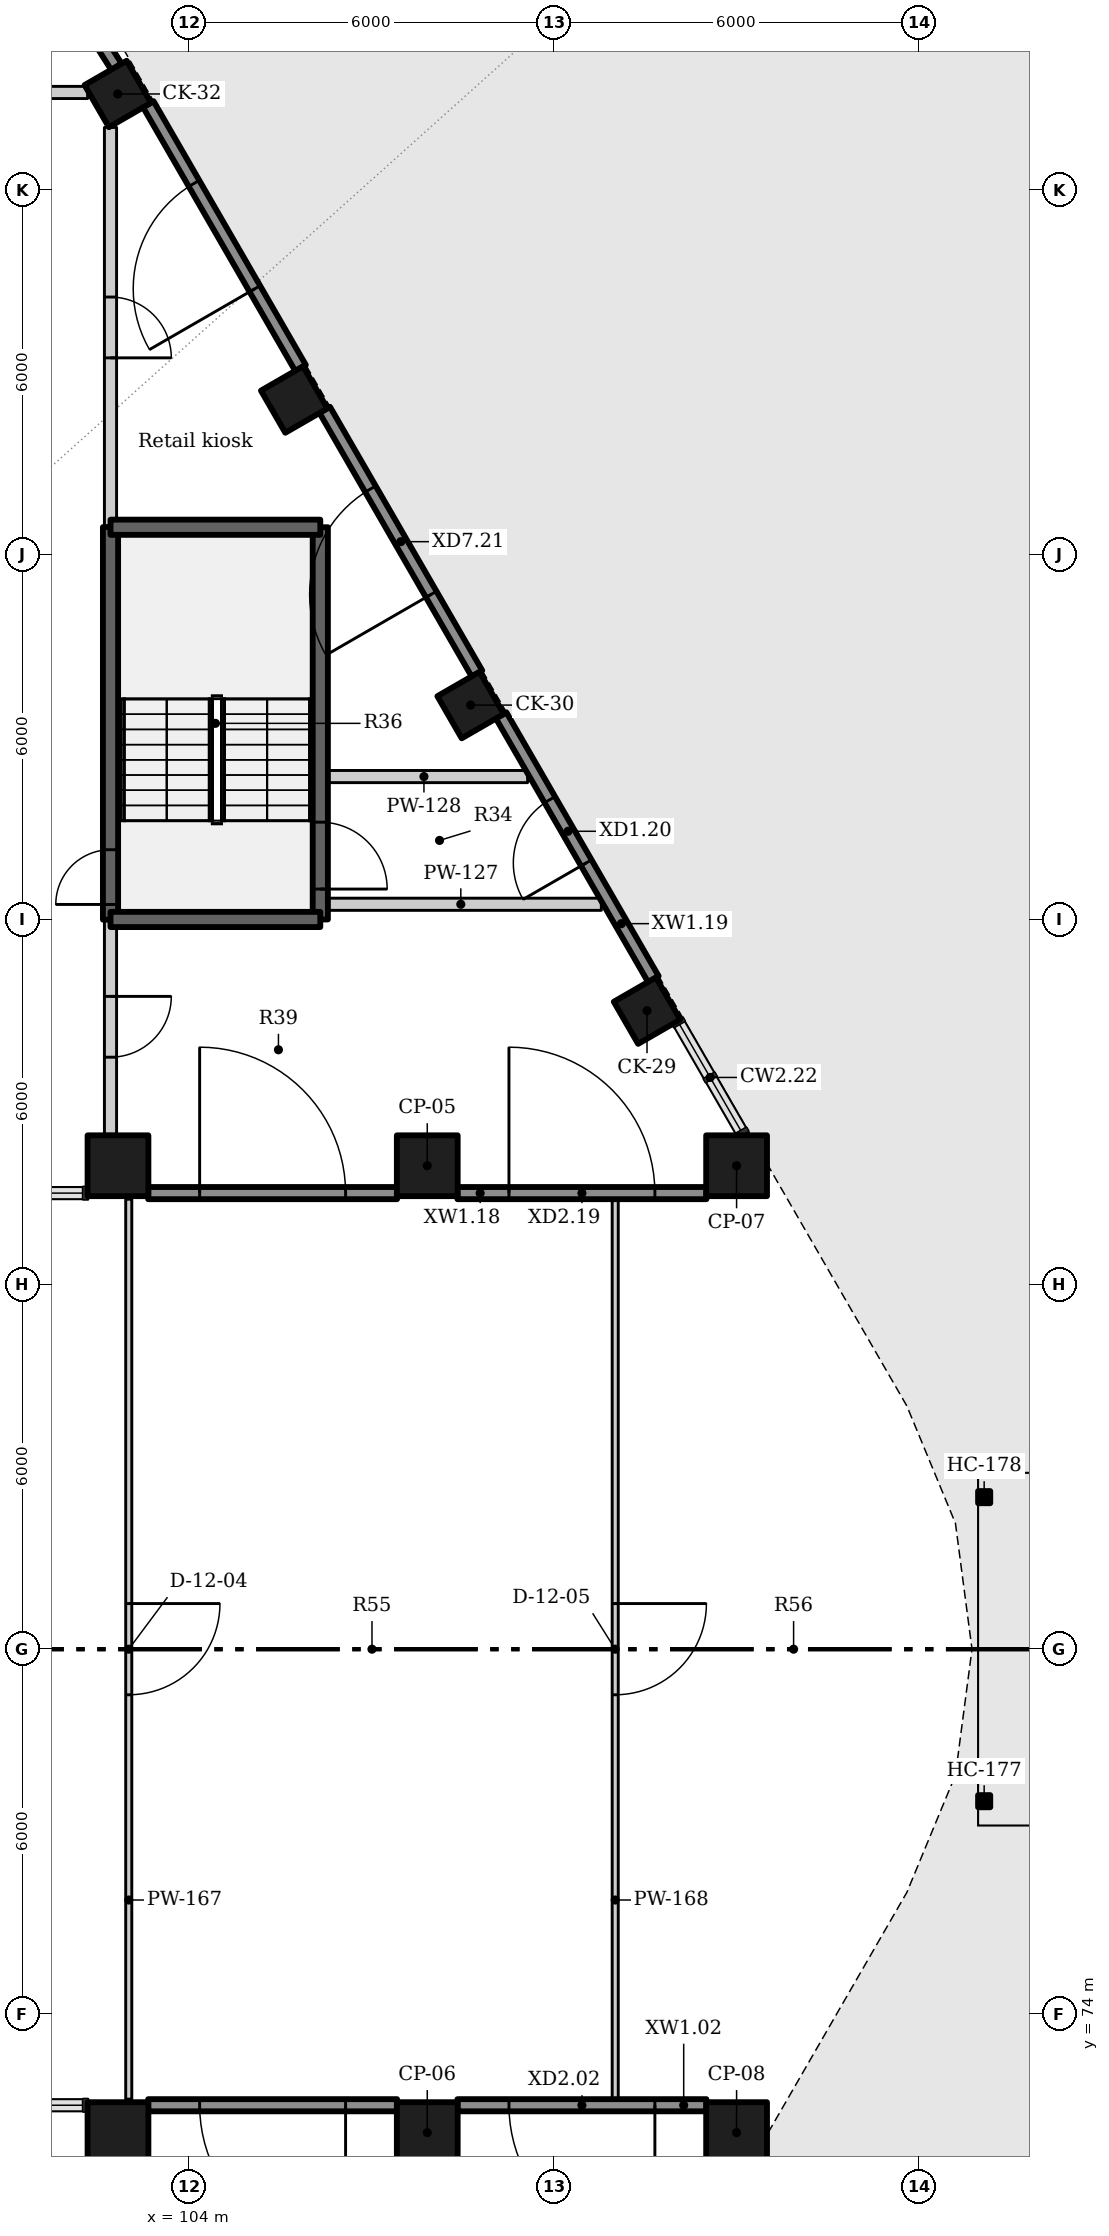
"""IFC4 building model, lengths in metres.
Left out: names, types, materials, properties, quantities, classifications, styles, units other than length and angle.
Written with IfcOpenShell. Run it as: python <this file> out.ifc"""

import sys

from ifc_helpers import new_model, si_unit, direction, frame, frame_2d, origin, origin_2d, place, context, subcontext, project, spatial, rectangle, hollow_rectangle, extrude, element, fill, save


model = new_model("IFC4")
c1 = context("Model", 3, precision=1e-05, world=origin(), true_north=direction((0.0, 1.0)))
c2 = subcontext(c1, "Body", "Model", "MODEL_VIEW")
j1 = project(units=[si_unit("LENGTHUNIT", "METRE"), si_unit("PLANEANGLEUNIT", "RADIAN")], contexts=[c1])
p1 = place(None, origin())
s1 = spatial("IfcSite", under=j1, at=p1, CompositionType="ELEMENT")
p2 = place(p1, origin())
s2 = spatial("IfcBuilding", under=s1, at=p2, CompositionType="ELEMENT")
p3 = place(p2, origin())
s3 = spatial("IfcBuildingStorey", under=s2, at=p3, CompositionType="ELEMENT", Elevation=0.0)
for number, where, z_axis, x_axis in (
    (1, (111.523, 90.5, -1.8), (0.0, 0.0, 1.0), (-0.5, 0.866, 0.0)),
    (2, (108.622, 95.525, -1.8), (0.0, 0.0, 1.0), (-0.5, 0.866, 0.0)),
    (3, (105.721, 100.55, -1.8), (0.0, 0.0, 1.0), (-0.5, 0.866, 0.0)),
    (4, (102.82, 105.575, -1.8), (0.0, 0.0, 1.0), (-0.5, 0.866, 0.0)),
):
    element("IfcColumn", number, at=place(p3, frame(where, z_axis=z_axis, x_axis=x_axis)), inside=s3, PredefinedType="COLUMN", context=c2, shape_type="SweptSolid", body=[
        extrude(rectangle(XDim=0.8, YDim=0.8, at=origin_2d()), origin(), (0.0, 0.0, 1.0), 8.4),
    ])
for number, where, z_axis, x_axis in (
    (5, (102.823, 87.95, -1.8), (0.0, 0.0, 1.0), (1.0, 0.0, 0.0)),
    (6, (102.823, 72.05, -1.8), (0.0, 0.0, 1.0), (1.0, 0.0, 0.0)),
    (7, (107.909, 87.95, -1.8), (0.0, 0.0, 1.0), (1.0, 0.0, 0.0)),
    (8, (107.909, 72.05, -1.8), (0.0, 0.0, 1.0), (1.0, 0.0, 0.0)),
    (9, (112.996, 87.95, -1.8), (0.0, 0.0, 1.0), (1.0, 0.0, 0.0)),
    (10, (112.996, 72.05, -1.8), (0.0, 0.0, 1.0), (1.0, 0.0, 0.0)),
):
    element("IfcColumn", number, at=place(p3, frame(where, z_axis=z_axis, x_axis=x_axis)), inside=s3, PredefinedType="COLUMN", context=c2, shape_type="SweptSolid", body=[
        extrude(rectangle(XDim=1.0, YDim=1.0, at=origin_2d()), origin(), (0.0, 0.0, 1.0), 8.4),
    ])
p4 = place(p3, frame((112.5, 72.5, 0.0), z_axis=(0.0, 0.0, 1.0), x_axis=(-1.0, 0.0, 0.0)))
e11 = element("IfcWall", 11, at=p4, inside=s3, PredefinedType="SOLIDWALL", context=c2, shape_type="SweptSolid", body=[
    extrude(rectangle(XDim=4.095, YDim=0.2, at=frame_2d((2.047, 0.0))), origin(), (0.0, 0.0, 1.0), 5.4),
])
p5 = place(p4, frame((0.847, 0.0, 0.0)))
e12 = element("IfcOpeningElement", 12, at=p5, cuts=e11, PredefinedType="OPENING", context=c2, shape_type="SweptSolid", body=[
    extrude(rectangle(XDim=2.4, YDim=2.7, at=frame_2d((1.2, 1.35))), frame((0.0, 0.11, 0.0), z_axis=(0.0, -1.0, 0.0), x_axis=(1.0, 0.0, 0.0)), (0.0, 0.0, 1.0), 0.22),
])
p6 = place(p3, frame((107.413, 72.5, 0.0), z_axis=(0.0, 0.0, 1.0), x_axis=(-1.0, 0.0, 0.0)))
e13 = element("IfcWall", 13, at=p6, inside=s3, PredefinedType="SOLIDWALL", context=c2, shape_type="SweptSolid", body=[
    extrude(rectangle(XDim=4.094, YDim=0.2, at=frame_2d((2.047, 0.0))), origin(), (0.0, 0.0, 1.0), 5.4),
])
p7 = place(p6, frame((0.847, 0.0, 0.0)))
e14 = element("IfcOpeningElement", 14, at=p7, cuts=e13, PredefinedType="OPENING", context=c2, shape_type="SweptSolid", body=[
    extrude(rectangle(XDim=2.4, YDim=2.7, at=frame_2d((1.2, 1.35))), frame((0.0, 0.11, 0.0), z_axis=(0.0, -1.0, 0.0), x_axis=(1.0, 0.0, 0.0)), (0.0, 0.0, 1.0), 0.22),
])
p8 = place(p3, frame((103.319, 87.5, 0.0), z_axis=(0.0, 0.0, 1.0), x_axis=(1.0, 0.0, 0.0)))
e15 = element("IfcWall", 15, at=p8, inside=s3, PredefinedType="SOLIDWALL", context=c2, shape_type="SweptSolid", body=[
    extrude(rectangle(XDim=4.094, YDim=0.2, at=frame_2d((2.047, 0.0))), origin(), (0.0, 0.0, 1.0), 5.4),
])
p9 = place(p8, frame((0.847, 0.0, 0.0)))
e16 = element("IfcOpeningElement", 16, at=p9, cuts=e15, PredefinedType="OPENING", context=c2, shape_type="SweptSolid", body=[
    extrude(rectangle(XDim=2.4, YDim=2.7, at=frame_2d((1.2, 1.35))), frame((0.0, 0.11, 0.0), z_axis=(0.0, -1.0, 0.0), x_axis=(1.0, 0.0, 0.0)), (0.0, 0.0, 1.0), 0.22),
])
p10 = place(p3, frame((108.405, 87.5, 0.0), z_axis=(0.0, 0.0, 1.0), x_axis=(1.0, 0.0, 0.0)))
e17 = element("IfcWall", 17, at=p10, inside=s3, PredefinedType="SOLIDWALL", context=c2, shape_type="SweptSolid", body=[
    extrude(rectangle(XDim=4.095, YDim=0.2, at=frame_2d((2.047, 0.0))), origin(), (0.0, 0.0, 1.0), 5.4),
])
p11 = place(p10, frame((0.847, 0.0, 0.0)))
e18 = element("IfcOpeningElement", 18, at=p11, cuts=e17, PredefinedType="OPENING", context=c2, shape_type="SweptSolid", body=[
    extrude(rectangle(XDim=2.4, YDim=2.7, at=frame_2d((1.2, 1.35))), frame((0.0, 0.11, 0.0), z_axis=(0.0, -1.0, 0.0), x_axis=(1.0, 0.0, 0.0)), (0.0, 0.0, 1.0), 0.22),
])
p12 = place(p3, frame((111.628, 91.018, 0.0), z_axis=(0.0, 0.0, 1.0), x_axis=(-0.499990997566, 0.86603060128, 0.0)))
e19 = element("IfcWall", 19, at=p12, inside=s3, PredefinedType="SOLIDWALL", context=c2, shape_type="SweptSolid", body=[
    extrude(rectangle(XDim=5.01, YDim=0.2, at=frame_2d((2.505, 0.0))), origin(), (0.0, 0.0, 1.0), 5.4),
])
p13 = place(p12, frame((2.208, 0.0, 0.0)))
e20 = element("IfcOpeningElement", 20, at=p13, cuts=e19, PredefinedType="OPENING", context=c2, shape_type="SweptSolid", body=[
    extrude(rectangle(XDim=1.2, YDim=2.4, at=frame_2d((0.6, 1.2))), frame((0.0, 0.11, 0.0), z_axis=(0.0, -1.0, 0.0), x_axis=(1.0, 0.0, 0.0)), (0.0, 0.0, 1.0), 0.22),
])
p14 = place(p3, frame((108.727, 96.043, 0.0), z_axis=(0.0, 0.0, 1.0), x_axis=(-0.499990997566, 0.86603060128, 0.0)))
e21 = element("IfcWall", 21, at=p14, inside=s3, PredefinedType="SOLIDWALL", context=c2, shape_type="SweptSolid", body=[
    extrude(rectangle(XDim=5.01, YDim=0.2, at=frame_2d((2.505, 0.0))), origin(), (0.0, 0.0, 1.0), 5.4),
])
p15 = place(p14, frame((1.505, 0.0, 0.0)))
e22 = element("IfcOpeningElement", 22, at=p15, cuts=e21, PredefinedType="OPENING", context=c2, shape_type="SweptSolid", body=[
    extrude(rectangle(XDim=2.0, YDim=2.4, at=frame_2d((1.0, 1.2))), frame((0.0, 0.11, 0.0), z_axis=(0.0, -1.0, 0.0), x_axis=(1.0, 0.0, 0.0)), (0.0, 0.0, 1.0), 0.22),
])
p16 = place(p3, frame((105.826, 101.068, 0.0), z_axis=(0.0, 0.0, 1.0), x_axis=(-0.499990997566, 0.86603060128, 0.0)))
e23 = element("IfcWall", 23, at=p16, inside=s3, PredefinedType="SOLIDWALL", context=c2, shape_type="SweptSolid", body=[
    extrude(rectangle(XDim=5.01, YDim=0.2, at=frame_2d((2.505, 0.0))), origin(), (0.0, 0.0, 1.0), 5.4),
])
p17 = place(p16, frame((1.505, 0.0, 0.0)))
e24 = element("IfcOpeningElement", 24, at=p17, cuts=e23, PredefinedType="OPENING", context=c2, shape_type="SweptSolid", body=[
    extrude(rectangle(XDim=2.0, YDim=2.4, at=frame_2d((1.0, 1.2))), frame((0.0, 0.11, 0.0), z_axis=(0.0, -1.0, 0.0), x_axis=(1.0, 0.0, 0.0)), (0.0, 0.0, 1.0), 0.22),
])
p18 = place(p3, frame((102.798, 106.022, 0.0), z_axis=(0.0, 0.0, 1.0), x_axis=(-0.537671911107, 0.843154147239, 0.0)))
e25 = element("IfcWall", 25, at=p18, inside=s3, PredefinedType="SOLIDWALL", context=c2, shape_type="SweptSolid", body=[
    extrude(rectangle(XDim=5.057, YDim=0.2, at=frame_2d((2.528, 0.0))), origin(), (0.0, 0.0, 1.0), 5.4),
])
p19 = place(p18, frame((1.928, 0.0, 0.0)))
e26 = element("IfcOpeningElement", 26, at=p19, cuts=e25, PredefinedType="OPENING", context=c2, shape_type="SweptSolid", body=[
    extrude(rectangle(XDim=1.2, YDim=2.4, at=frame_2d((0.6, 1.2))), frame((0.0, 0.11, 0.0), z_axis=(0.0, -1.0, 0.0), x_axis=(1.0, 0.0, 0.0)), (0.0, 0.0, 1.0), 0.22),
])
p20 = place(p3, frame((102.7, 91.997, -1.8), z_axis=(0.0, 0.0, 1.0), x_axis=(0.0, 1.0, 0.0)))
e27 = element("IfcWall", 27, at=p20, inside=s3, PredefinedType="SHEAR", context=c2, shape_type="SweptSolid", body=[
    extrude(rectangle(XDim=6.456, YDim=0.25, at=frame_2d((3.228, 0.0))), origin(), (0.0, 0.0, 1.0), 8.1),
])
p21 = place(p20, frame((0.25, 0.0, 1.8)))
e28 = element("IfcOpeningElement", 28, at=p21, cuts=e27, PredefinedType="OPENING", context=c2, shape_type="SweptSolid", body=[
    extrude(rectangle(XDim=0.9, YDim=2.1, at=frame_2d((0.45, 1.05))), frame((0.0, 0.135, 0.0), z_axis=(0.0, -1.0, 0.0), x_axis=(1.0, 0.0, 0.0)), (0.0, 0.0, 1.0), 0.27),
])
p22 = place(p3, frame((102.7, 92.003, 0.0), z_axis=(0.0, 0.0, 1.0), x_axis=(0.0, -1.0, 0.0)))
e29 = element("IfcWall", 29, at=p22, inside=s3, PredefinedType="PARTITIONING", context=c2, shape_type="SweptSolid", body=[
    extrude(rectangle(XDim=3.536, YDim=0.2, at=frame_2d((1.768, 0.0))), origin(), (0.0, 0.0, 1.0), 6.3),
])
p23 = place(p22, frame((1.268, 0.0, 0.0)))
e30 = element("IfcOpeningElement", 30, at=p23, cuts=e29, PredefinedType="OPENING", context=c2, shape_type="SweptSolid", body=[
    extrude(rectangle(XDim=1.0, YDim=2.1, at=frame_2d((0.5, 1.05))), frame((0.0, 0.11, 0.0), z_axis=(0.0, -1.0, 0.0), x_axis=(1.0, 0.0, 0.0)), (0.0, 0.0, 1.0), 0.22),
])
p24 = place(p3, frame((102.7, 105.025, 0.0), z_axis=(0.0, 0.0, 1.0), x_axis=(0.0, -1.0, 0.0)))
e31 = element("IfcWall", 31, at=p24, inside=s3, PredefinedType="PARTITIONING", context=c2, shape_type="SweptSolid", body=[
    extrude(rectangle(XDim=6.578, YDim=0.2, at=frame_2d((3.289, 0.0))), origin(), (0.0, 0.0, 1.0), 6.3),
])
p25 = place(p24, frame((2.789, 0.0, 0.0)))
e32 = element("IfcOpeningElement", 32, at=p25, cuts=e31, PredefinedType="OPENING", context=c2, shape_type="SweptSolid", body=[
    extrude(rectangle(XDim=1.0, YDim=2.1, at=frame_2d((0.5, 1.05))), frame((0.0, 0.11, 0.0), z_axis=(0.0, -1.0, 0.0), x_axis=(1.0, 0.0, 0.0)), (0.0, 0.0, 1.0), 0.22),
])
p26 = place(p3, frame((81.6, 105.6, 0.0), z_axis=(0.0, 0.0, 1.0), x_axis=(1.0, 0.0, 0.0)))
e33 = element("IfcWall", 33, at=p26, inside=s3, PredefinedType="PARTITIONING", context=c2, shape_type="SweptSolid", body=[
    extrude(rectangle(XDim=20.723, YDim=0.2, at=frame_2d((10.362, 0.0))), origin(), (0.0, 0.0, 1.0), 6.3),
])
p27 = place(p26, frame((11.951, 0.0, 0.0)))
e34 = element("IfcOpeningElement", 34, at=p27, cuts=e33, PredefinedType="OPENING", context=c2, shape_type="SweptSolid", body=[
    extrude(rectangle(XDim=1.0, YDim=2.1, at=frame_2d((0.5, 1.05))), frame((0.0, 0.11, 0.0), z_axis=(0.0, -1.0, 0.0), x_axis=(1.0, 0.0, 0.0)), (0.0, 0.0, 1.0), 0.22),
])
p28 = place(p3, frame((106.15, 98.45, -1.8), z_axis=(0.0, 0.0, 1.0), x_axis=(0.0, -1.0, 0.0)))
e35 = element("IfcWall", 35, at=p28, inside=s3, PredefinedType="SHEAR", context=c2, shape_type="SweptSolid", body=[
    extrude(rectangle(XDim=6.45, YDim=0.25, at=frame_2d((3.225, 0.0))), origin(), (0.0, 0.0, 1.0), 8.1),
])
p29 = place(p28, frame((4.85, 0.0, 1.8)))
e36 = element("IfcOpeningElement", 36, at=p29, cuts=e35, PredefinedType="OPENING", context=c2, shape_type="SweptSolid", body=[
    extrude(rectangle(XDim=1.1, YDim=2.1, at=frame_2d((0.55, 1.05))), frame((0.0, 0.135, 0.0), z_axis=(0.0, -1.0, 0.0), x_axis=(1.0, 0.0, 0.0)), (0.0, 0.0, 1.0), 0.27),
])
p30 = place(p3, frame((106.15, 92.25, 0.0), z_axis=(0.0, 0.0, 1.0), x_axis=(1.0, 0.0, 0.0)))
e37 = element("IfcWall", 37, at=p30, inside=s3, PredefinedType="PARTITIONING", context=c2, shape_type="SweptSolid", body=[
    extrude(rectangle(XDim=4.622, YDim=0.2, at=frame_2d((2.311, 0.0))), origin(), (0.0, 0.0, 1.0), 5.53),
])
p31 = place(p3, frame((106.15, 94.35, 0.0), z_axis=(0.0, 0.0, 1.0), x_axis=(1.0, 0.0, 0.0)))
e38 = element("IfcWall", 38, at=p31, inside=s3, PredefinedType="PARTITIONING", context=c2, shape_type="SweptSolid", body=[
    extrude(rectangle(XDim=3.409, YDim=0.2, at=frame_2d((1.705, 0.0))), origin(), (0.0, 0.0, 1.0), 5.53),
])
for number, where, z_axis, x_axis in (
    (39, (102.7, 92.0, -1.8), (0.0, 0.0, 1.0), (1.0, 0.0, 0.0)),
    (40, (102.7, 98.45, -1.8), (0.0, 0.0, 1.0), (1.0, 0.0, 0.0)),
):
    element("IfcWall", number, at=place(p3, frame(where, z_axis=z_axis, x_axis=x_axis)), inside=s3, PredefinedType="SHEAR", context=c2, shape_type="SweptSolid", body=[
        extrude(rectangle(XDim=3.45, YDim=0.25, at=frame_2d((1.725, 0.0))), origin(), (0.0, 0.0, 1.0), 8.1),
    ])
p32 = place(p3, frame((103.0, 87.4, 0.0), z_axis=(0.0, 0.0, 1.0), x_axis=(0.0, -1.0, 0.0)))
e41 = element("IfcWall", 41, at=p32, inside=s3, PredefinedType="PARTITIONING", context=c2, shape_type="SweptSolid", body=[
    extrude(rectangle(XDim=14.8, YDim=0.1, at=frame_2d((7.4, 0.0))), origin(), (0.0, 0.0, 1.0), 6.3),
])
p33 = place(p32, frame((6.65, 0.0, 0.0)))
e42 = element("IfcOpeningElement", 42, at=p33, cuts=e41, PredefinedType="OPENING", context=c2, shape_type="SweptSolid", body=[
    extrude(rectangle(XDim=1.5, YDim=2.1, at=frame_2d((0.75, 1.05))), frame((0.0, 0.06, 0.0), z_axis=(0.0, -1.0, 0.0), x_axis=(1.0, 0.0, 0.0)), (0.0, 0.0, 1.0), 0.12),
])
p34 = place(p3, frame((111.0, 87.4, 0.0), z_axis=(0.0, 0.0, 1.0), x_axis=(0.0, -1.0, 0.0)))
e43 = element("IfcWall", 43, at=p34, inside=s3, PredefinedType="PARTITIONING", context=c2, shape_type="SweptSolid", body=[
    extrude(rectangle(XDim=14.8, YDim=0.1, at=frame_2d((7.4, 0.0))), origin(), (0.0, 0.0, 1.0), 6.3),
])
p35 = place(p34, frame((6.65, 0.0, 0.0)))
e44 = element("IfcOpeningElement", 44, at=p35, cuts=e43, PredefinedType="OPENING", context=c2, shape_type="SweptSolid", body=[
    extrude(rectangle(XDim=1.5, YDim=2.1, at=frame_2d((0.75, 1.05))), frame((0.0, 0.06, 0.0), z_axis=(0.0, -1.0, 0.0), x_axis=(1.0, 0.0, 0.0)), (0.0, 0.0, 1.0), 0.12),
])
for number, where, z_axis, x_axis in (
    (45, (117.067, 77.5, 0.0), (0.0, 0.0, 1.0), (1.0, 0.0, 0.0)),
    (46, (117.067, 82.5, 0.0), (0.0, 0.0, 1.0), (1.0, 0.0, 0.0)),
):
    element("IfcColumn", number, at=place(p3, frame(where, z_axis=z_axis, x_axis=x_axis)), inside=s3, PredefinedType="COLUMN", context=c2, shape_type="SweptSolid", body=[
        extrude(hollow_rectangle(XDim=0.2, YDim=0.2, WallThickness=0.009, at=origin_2d()), origin(), (0.0, 0.0, 1.0), 2.9),
    ])
p36 = place(p5, origin())
e47 = element("IfcDoor", 47, at=p36, inside=s3, OperationType="DOUBLE_DOOR_DOUBLE_SWING", PredefinedType="DOOR", context=c2, shape_type="SweptSolid", body=[
    extrude(rectangle(XDim=2.4, YDim=2.7, at=frame_2d((1.2, 1.35))), frame((0.0, 0.025, 0.0), z_axis=(0.0, -1.0, 0.0), x_axis=(1.0, 0.0, 0.0)), (0.0, 0.0, 1.0), 0.05),
])
fill(e12, e47)
p37 = place(p7, origin())
e48 = element("IfcDoor", 48, at=p37, inside=s3, OperationType="DOUBLE_DOOR_DOUBLE_SWING", PredefinedType="DOOR", context=c2, shape_type="SweptSolid", body=[
    extrude(rectangle(XDim=2.4, YDim=2.7, at=frame_2d((1.2, 1.35))), frame((0.0, 0.025, 0.0), z_axis=(0.0, -1.0, 0.0), x_axis=(1.0, 0.0, 0.0)), (0.0, 0.0, 1.0), 0.05),
])
fill(e14, e48)
p38 = place(p9, origin())
e49 = element("IfcDoor", 49, at=p38, inside=s3, OperationType="DOUBLE_DOOR_DOUBLE_SWING", PredefinedType="DOOR", context=c2, shape_type="SweptSolid", body=[
    extrude(rectangle(XDim=2.4, YDim=2.7, at=frame_2d((1.2, 1.35))), frame((0.0, 0.025, 0.0), z_axis=(0.0, -1.0, 0.0), x_axis=(1.0, 0.0, 0.0)), (0.0, 0.0, 1.0), 0.05),
])
fill(e16, e49)
p39 = place(p11, origin())
e50 = element("IfcDoor", 50, at=p39, inside=s3, OperationType="DOUBLE_DOOR_DOUBLE_SWING", PredefinedType="DOOR", context=c2, shape_type="SweptSolid", body=[
    extrude(rectangle(XDim=2.4, YDim=2.7, at=frame_2d((1.2, 1.35))), frame((0.0, 0.025, 0.0), z_axis=(0.0, -1.0, 0.0), x_axis=(1.0, 0.0, 0.0)), (0.0, 0.0, 1.0), 0.05),
])
fill(e18, e50)
p40 = place(p13, frame((1.2, 0.0, 0.0), z_axis=(0.0, 0.0, 1.0), x_axis=(-1.0, 0.0, 0.0)))
e51 = element("IfcDoor", 51, at=p40, inside=s3, OperationType="SINGLE_SWING_LEFT", PredefinedType="DOOR", context=c2, shape_type="SweptSolid", body=[
    extrude(rectangle(XDim=1.2, YDim=2.4, at=frame_2d((0.6, 1.2))), frame((0.0, 0.025, 0.0), z_axis=(0.0, -1.0, 0.0), x_axis=(1.0, 0.0, 0.0)), (0.0, 0.0, 1.0), 0.05),
])
fill(e20, e51)
p41 = place(p15, frame((2.0, 0.0, 0.0), z_axis=(0.0, 0.0, 1.0), x_axis=(-1.0, 0.0, 0.0)))
e52 = element("IfcDoor", 52, at=p41, inside=s3, OperationType="DOUBLE_DOOR_DOUBLE_SWING", PredefinedType="DOOR", context=c2, shape_type="SweptSolid", body=[
    extrude(rectangle(XDim=2.0, YDim=2.4, at=frame_2d((1.0, 1.2))), frame((0.0, 0.025, 0.0), z_axis=(0.0, -1.0, 0.0), x_axis=(1.0, 0.0, 0.0)), (0.0, 0.0, 1.0), 0.05),
])
fill(e22, e52)
p42 = place(p17, frame((2.0, 0.0, 0.0), z_axis=(0.0, 0.0, 1.0), x_axis=(-1.0, 0.0, 0.0)))
e53 = element("IfcDoor", 53, at=p42, inside=s3, OperationType="DOUBLE_DOOR_DOUBLE_SWING", PredefinedType="DOOR", context=c2, shape_type="SweptSolid", body=[
    extrude(rectangle(XDim=2.0, YDim=2.4, at=frame_2d((1.0, 1.2))), frame((0.0, 0.025, 0.0), z_axis=(0.0, -1.0, 0.0), x_axis=(1.0, 0.0, 0.0)), (0.0, 0.0, 1.0), 0.05),
])
fill(e24, e53)
p43 = place(p29, origin())
e54 = element("IfcDoor", 54, at=p43, inside=s3, OperationType="SINGLE_SWING_RIGHT", PredefinedType="DOOR", context=c2, shape_type="SweptSolid", body=[
    extrude(rectangle(XDim=1.1, YDim=2.1, at=frame_2d((0.55, 1.05))), frame((0.0, 0.025, 0.0), z_axis=(0.0, -1.0, 0.0), x_axis=(1.0, 0.0, 0.0)), (0.0, 0.0, 1.0), 0.05),
])
fill(e36, e54)
p44 = place(p21, origin())
e55 = element("IfcDoor", 55, at=p44, inside=s3, OperationType="SINGLE_SWING_LEFT", PredefinedType="DOOR", context=c2, shape_type="SweptSolid", body=[
    extrude(rectangle(XDim=0.9, YDim=2.1, at=frame_2d((0.45, 1.05))), frame((0.0, 0.025, 0.0), z_axis=(0.0, -1.0, 0.0), x_axis=(1.0, 0.0, 0.0)), (0.0, 0.0, 1.0), 0.05),
])
fill(e28, e55)
p45 = place(p23, origin())
e56 = element("IfcDoor", 56, at=p45, inside=s3, OperationType="SINGLE_SWING_LEFT", PredefinedType="DOOR", context=c2, shape_type="SweptSolid", body=[
    extrude(rectangle(XDim=1.0, YDim=2.1, at=frame_2d((0.5, 1.05))), frame((0.0, 0.025, 0.0), z_axis=(0.0, -1.0, 0.0), x_axis=(1.0, 0.0, 0.0)), (0.0, 0.0, 1.0), 0.05),
])
fill(e30, e56)
p46 = place(p25, origin())
e57 = element("IfcDoor", 57, at=p46, inside=s3, OperationType="SINGLE_SWING_RIGHT", PredefinedType="DOOR", context=c2, shape_type="SweptSolid", body=[
    extrude(rectangle(XDim=1.0, YDim=2.1, at=frame_2d((0.5, 1.05))), frame((0.0, 0.025, 0.0), z_axis=(0.0, -1.0, 0.0), x_axis=(1.0, 0.0, 0.0)), (0.0, 0.0, 1.0), 0.05),
])
fill(e32, e57)
p47 = place(p33, origin())
e58 = element("IfcDoor", 58, at=p47, inside=s3, OperationType="DOUBLE_DOOR_SINGLE_SWING", PredefinedType="DOOR", context=c2, shape_type="SweptSolid", body=[
    extrude(rectangle(XDim=1.5, YDim=2.1, at=frame_2d((0.75, 1.05))), frame((0.0, 0.025, 0.0), z_axis=(0.0, -1.0, 0.0), x_axis=(1.0, 0.0, 0.0)), (0.0, 0.0, 1.0), 0.05),
])
fill(e42, e58)
p48 = place(p35, origin())
e59 = element("IfcDoor", 59, at=p48, inside=s3, OperationType="DOUBLE_DOOR_SINGLE_SWING", PredefinedType="DOOR", context=c2, shape_type="SweptSolid", body=[
    extrude(rectangle(XDim=1.5, YDim=2.1, at=frame_2d((0.75, 1.05))), frame((0.0, 0.025, 0.0), z_axis=(0.0, -1.0, 0.0), x_axis=(1.0, 0.0, 0.0)), (0.0, 0.0, 1.0), 0.05),
])
fill(e44, e59)
save(model, sys.argv[1])
